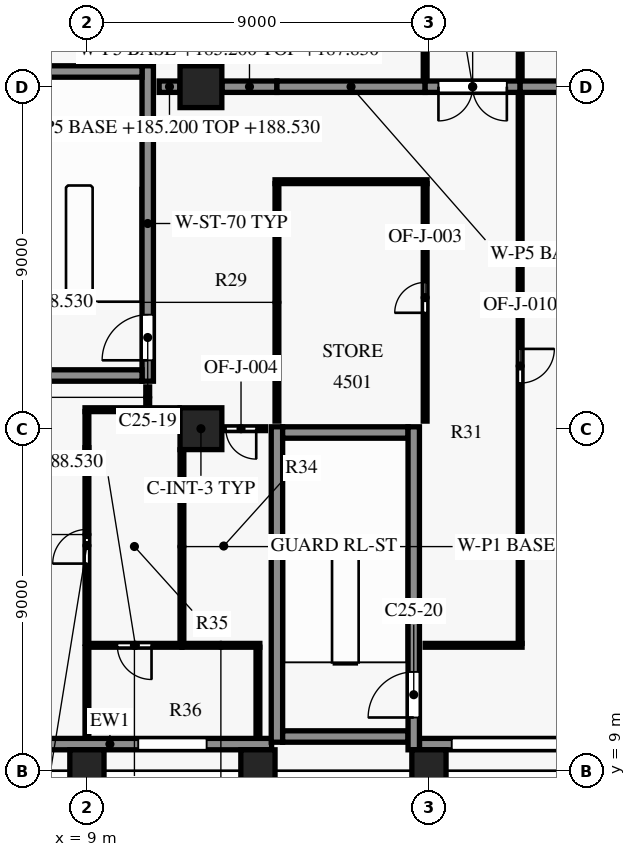
"""IFC4 building model, lengths in metres.
Left out: names, types, materials, properties, quantities, classifications, styles, units other than length and angle.
Written with IfcOpenShell. Run it as: python <this file> out.ifc"""

import sys

from ifc_helpers import new_model, si_unit, direction, frame, frame_2d, origin, origin_2d, place, context, subcontext, project, spatial, rectangle, extrude, element, fill, save


model = new_model("IFC4")
c1 = context("Model", 3, precision=1e-05, world=origin(), true_north=direction((0.0, 1.0)))
c2 = subcontext(c1, "Body", "Model", "MODEL_VIEW")
j1 = project(units=[si_unit("LENGTHUNIT", "METRE"), si_unit("PLANEANGLEUNIT", "RADIAN")], contexts=[c1])
p1 = place(None, origin())
s1 = spatial("IfcSite", under=j1, at=p1, CompositionType="ELEMENT")
p2 = place(p1, origin())
s2 = spatial("IfcBuilding", under=s1, at=p2, CompositionType="ELEMENT")
p3 = place(p2, frame((0.0, 0.0, 185.2)))
s3 = spatial("IfcBuildingStorey", under=s2, at=p3, CompositionType="ELEMENT", Elevation=185.2)
for number, where, z_axis, x_axis in (
    (1, (9.0, 9.0, 0.0), (0.0, 0.0, 1.0), (1.0, 0.0, 0.0)),
    (2, (13.5, 9.0, 0.0), (0.0, 0.0, 1.0), (1.0, 0.0, 0.0)),
    (3, (18.0, 9.0, 0.0), (0.0, 0.0, 1.0), (1.0, 0.0, 0.0)),
):
    element("IfcColumn", number, at=place(p3, frame(where, z_axis=z_axis, x_axis=x_axis)), inside=s3, PredefinedType="COLUMN", context=c2, shape_type="SweptSolid", body=[
        extrude(rectangle(XDim=0.9, YDim=1.1, at=origin_2d()), origin(), (0.0, 0.0, 1.0), 3.8),
    ])
for number, where, z_axis, x_axis in (
    (4, (12.0, 18.0, 0.0), (0.0, 0.0, 1.0), (1.0, 0.0, 0.0)),
    (5, (12.0, 27.0, 0.0), (0.0, 0.0, 1.0), (1.0, 0.0, 0.0)),
):
    element("IfcColumn", number, at=place(p3, frame(where, z_axis=z_axis, x_axis=x_axis)), inside=s3, PredefinedType="COLUMN", context=c2, shape_type="SweptSolid", body=[
        extrude(rectangle(XDim=1.1, YDim=1.1, at=origin_2d()), origin(), (0.0, 0.0, 1.0), 3.8),
    ])
p4 = place(p3, frame((13.86, 9.7, 0.0), z_axis=(0.0, 0.0, 1.0), x_axis=(-1.0, 0.0, 0.0)))
e6 = element("IfcWall", 6, at=p4, inside=s3, PredefinedType="SOLIDWALL", context=c2, shape_type="SweptSolid", body=[
    extrude(rectangle(XDim=8.51, YDim=0.3, at=frame_2d((4.255, 0.0))), origin(), (0.0, 0.0, 1.0), 3.15),
])
p5 = place(p4, frame((1.71, 0.0, 0.75)))
e7 = element("IfcOpeningElement", 7, at=p5, cuts=e6, PredefinedType="OPENING", context=c2, shape_type="SweptSolid", body=[
    extrude(rectangle(XDim=1.8, YDim=1.8, at=frame_2d((0.9, 0.9))), frame((0.0, 0.16, 0.0), z_axis=(0.0, -1.0, 0.0), x_axis=(1.0, 0.0, 0.0)), (0.0, 0.0, 1.0), 0.32),
])
p6 = place(p4, frame((6.21, 0.0, 0.75)))
e8 = element("IfcOpeningElement", 8, at=p6, cuts=e6, PredefinedType="OPENING", context=c2, shape_type="SweptSolid", body=[
    extrude(rectangle(XDim=1.8, YDim=1.8, at=frame_2d((0.9, 0.9))), frame((0.0, 0.16, 0.0), z_axis=(0.0, -1.0, 0.0), x_axis=(1.0, 0.0, 0.0)), (0.0, 0.0, 1.0), 0.32),
])
p7 = place(p3, frame((30.95, 9.7, 0.0), z_axis=(0.0, 0.0, 1.0), x_axis=(-1.0, 0.0, 0.0)))
e9 = element("IfcWall", 9, at=p7, inside=s3, PredefinedType="SOLIDWALL", context=c2, shape_type="SweptSolid", body=[
    extrude(rectangle(XDim=13.2, YDim=0.3, at=frame_2d((6.6, 0.0))), origin(), (0.0, 0.0, 1.0), 3.15),
])
p8 = place(p7, frame((0.8, 0.0, 0.75)))
e10 = element("IfcOpeningElement", 10, at=p8, cuts=e9, PredefinedType="OPENING", context=c2, shape_type="SweptSolid", body=[
    extrude(rectangle(XDim=1.8, YDim=1.8, at=frame_2d((0.9, 0.9))), frame((0.0, 0.16, 0.0), z_axis=(0.0, -1.0, 0.0), x_axis=(1.0, 0.0, 0.0)), (0.0, 0.0, 1.0), 0.32),
])
p9 = place(p7, frame((5.3, 0.0, 0.75)))
e11 = element("IfcOpeningElement", 11, at=p9, cuts=e9, PredefinedType="OPENING", context=c2, shape_type="SweptSolid", body=[
    extrude(rectangle(XDim=1.8, YDim=1.8, at=frame_2d((0.9, 0.9))), frame((0.0, 0.16, 0.0), z_axis=(0.0, -1.0, 0.0), x_axis=(1.0, 0.0, 0.0)), (0.0, 0.0, 1.0), 0.32),
])
p10 = place(p7, frame((9.05, 0.0, 0.15)))
e12 = element("IfcOpeningElement", 12, at=p10, cuts=e9, PredefinedType="OPENING", context=c2, shape_type="SweptSolid", body=[
    extrude(rectangle(XDim=3.3, YDim=2.4, at=frame_2d((1.65, 1.2))), frame((0.0, 0.16, 0.0), z_axis=(0.0, -1.0, 0.0), x_axis=(1.0, 0.0, 0.0)), (0.0, 0.0, 1.0), 0.32),
])
for number, where, z_axis, x_axis in (
    (13, (14.15, 9.9, 0.0), (0.0, 0.0, 1.0), (1.0, 0.0, 0.0)),
    (14, (14.15, 17.9, 0.0), (0.0, 0.0, 1.0), (1.0, 0.0, 0.0)),
    (15, (7.15, 19.4, 0.0), (0.0, 0.0, 1.0), (1.0, 0.0, 0.0)),
    (16, (7.15, 27.4, 0.0), (0.0, 0.0, 1.0), (1.0, 0.0, 0.0)),
):
    element("IfcWall", number, at=place(p3, frame(where, z_axis=z_axis, x_axis=x_axis)), inside=s3, PredefinedType="SHEAR", context=c2, shape_type="SweptSolid", body=[
        extrude(rectangle(XDim=3.3, YDim=0.3, at=frame_2d((1.65, 0.0))), origin(), (0.0, 0.0, 1.0), 3.5),
    ])
p11 = place(p3, frame((10.6, 19.25, 0.0), z_axis=(0.0, 0.0, 1.0), x_axis=(0.0, 1.0, 0.0)))
e17 = element("IfcWall", 17, at=p11, inside=s3, PredefinedType="SHEAR", context=c2, shape_type="SweptSolid", body=[
    extrude(rectangle(XDim=8.3, YDim=0.3, at=frame_2d((4.15, 0.0))), origin(), (0.0, 0.0, 1.0), 3.5),
])
p12 = place(p11, frame((0.55, 0.0, 0.0)))
e18 = element("IfcOpeningElement", 18, at=p12, cuts=e17, PredefinedType="OPENING", context=c2, shape_type="SweptSolid", body=[
    extrude(rectangle(XDim=1.2, YDim=2.2, at=frame_2d((0.6, 1.1))), frame((0.0, 0.16, 0.0), z_axis=(0.0, -1.0, 0.0), x_axis=(1.0, 0.0, 0.0)), (0.0, 0.0, 1.0), 0.32),
])
p13 = place(p3, frame((14.0, 9.75, 0.0), z_axis=(0.0, 0.0, 1.0), x_axis=(0.0, 1.0, 0.0)))
e19 = element("IfcWall", 19, at=p13, inside=s3, PredefinedType="SHEAR", context=c2, shape_type="SweptSolid", body=[
    extrude(rectangle(XDim=8.3, YDim=0.3, at=frame_2d((4.15, 0.0))), origin(), (0.0, 0.0, 1.0), 3.5),
])
p14 = place(p3, frame((17.6, 9.55, 0.0), z_axis=(0.0, 0.0, 1.0), x_axis=(0.0, 1.0, 0.0)))
e20 = element("IfcWall", 20, at=p14, inside=s3, PredefinedType="SHEAR", context=c2, shape_type="SweptSolid", body=[
    extrude(rectangle(XDim=8.5, YDim=0.3, at=frame_2d((4.25, 0.0))), origin(), (0.0, 0.0, 1.0), 3.5),
])
p15 = place(p14, frame((0.85, 0.0, 0.0)))
e21 = element("IfcOpeningElement", 21, at=p15, cuts=e20, PredefinedType="OPENING", context=c2, shape_type="SweptSolid", body=[
    extrude(rectangle(XDim=1.2, YDim=2.2, at=frame_2d((0.6, 1.1))), frame((0.0, 0.16, 0.0), z_axis=(0.0, -1.0, 0.0), x_axis=(1.0, 0.0, 0.0)), (0.0, 0.0, 1.0), 0.32),
])
p16 = place(p3, frame((9.0, 9.87, 0.0), z_axis=(0.0, 0.0, 1.0), x_axis=(0.0, 1.0, 0.0)))
e22 = element("IfcWall", 22, at=p16, inside=s3, PredefinedType="PARTITIONING", context=c2, shape_type="SweptSolid", body=[
    extrude(rectangle(XDim=2.38, YDim=0.1, at=frame_2d((1.19, 0.0))), origin(), (0.0, 0.0, 1.0), 3.33),
])
p17 = place(p3, frame((13.5, 12.25, 0.0), z_axis=(0.0, 0.0, 1.0), x_axis=(0.0, -1.0, 0.0)))
e23 = element("IfcWall", 23, at=p17, inside=s3, PredefinedType="PARTITIONING", context=c2, shape_type="SweptSolid", body=[
    extrude(rectangle(XDim=2.38, YDim=0.1, at=frame_2d((1.19, 0.0))), origin(), (0.0, 0.0, 1.0), 2.63),
])
p18 = place(p3, frame((11.5, 12.3, 0.0), z_axis=(0.0, 0.0, 1.0), x_axis=(-1.0, 0.0, 0.0)))
e24 = element("IfcWall", 24, at=p18, inside=s3, PredefinedType="PARTITIONING", context=c2, shape_type="SweptSolid", body=[
    extrude(rectangle(XDim=2.45, YDim=0.1, at=frame_2d((1.225, 0.0))), origin(), (0.0, 0.0, 1.0), 3.33),
])
p19 = place(p18, frame((0.8, 0.0, 0.0)))
e25 = element("IfcOpeningElement", 25, at=p19, cuts=e24, PredefinedType="OPENING", context=c2, shape_type="SweptSolid", body=[
    extrude(rectangle(XDim=0.9, YDim=2.1, at=frame_2d((0.45, 1.05))), frame((0.0, 0.06, 0.0), z_axis=(0.0, -1.0, 0.0), x_axis=(1.0, 0.0, 0.0)), (0.0, 0.0, 1.0), 0.12),
])
p20 = place(p3, frame((11.5, 12.3, 0.0), z_axis=(0.0, 0.0, 1.0), x_axis=(1.0, 0.0, 0.0)))
e26 = element("IfcWall", 26, at=p20, inside=s3, PredefinedType="PARTITIONING", context=c2, shape_type="SweptSolid", body=[
    extrude(rectangle(XDim=2.05, YDim=0.1, at=frame_2d((1.025, 0.0))), origin(), (0.0, 0.0, 1.0), 2.63),
])
p21 = place(p3, frame((20.45, 12.3, 0.0), z_axis=(0.0, 0.0, 1.0), x_axis=(-1.0, 0.0, 0.0)))
e27 = element("IfcWall", 27, at=p21, inside=s3, PredefinedType="PARTITIONING", context=c2, shape_type="SweptSolid", body=[
    extrude(rectangle(XDim=2.55, YDim=0.1, at=frame_2d((1.275, 0.0))), origin(), (0.0, 0.0, 1.0), 2.63),
])
p22 = place(p3, frame((9.0, 12.35, 0.0), z_axis=(0.0, 0.0, 1.0), x_axis=(0.0, 1.0, 0.0)))
e28 = element("IfcWall", 28, at=p22, inside=s3, PredefinedType="PARTITIONING", context=c2, shape_type="SweptSolid", body=[
    extrude(rectangle(XDim=5.15, YDim=0.1, at=frame_2d((2.575, 0.0))), origin(), (0.0, 0.0, 1.0), 3.33),
])
p23 = place(p22, frame((2.1, 0.0, 0.0)))
e29 = element("IfcOpeningElement", 29, at=p23, cuts=e28, PredefinedType="OPENING", context=c2, shape_type="SweptSolid", body=[
    extrude(rectangle(XDim=0.9, YDim=2.1, at=frame_2d((0.45, 1.05))), frame((0.0, 0.06, 0.0), z_axis=(0.0, -1.0, 0.0), x_axis=(1.0, 0.0, 0.0)), (0.0, 0.0, 1.0), 0.12),
])
p24 = place(p3, frame((11.5, 17.445, 0.0), z_axis=(0.0, 0.0, 1.0), x_axis=(0.0, -1.0, 0.0)))
e30 = element("IfcWall", 30, at=p24, inside=s3, PredefinedType="PARTITIONING", context=c2, shape_type="SweptSolid", body=[
    extrude(rectangle(XDim=5.095, YDim=0.1, at=frame_2d((2.547, 0.0))), origin(), (0.0, 0.0, 1.0), 3.33),
])
p25 = place(p3, frame((9.0, 17.5, 0.0), z_axis=(0.0, 0.0, 1.0), x_axis=(0.0, 1.0, 0.0)))
e31 = element("IfcWall", 31, at=p25, inside=s3, PredefinedType="PARTITIONING", context=c2, shape_type="SweptSolid", body=[
    extrude(rectangle(XDim=0.95, YDim=0.1, at=frame_2d((0.475, 0.0))), origin(), (0.0, 0.0, 1.0), 2.78),
])
p26 = place(p3, frame((13.7, 18.0, 0.0), z_axis=(0.0, 0.0, 1.0), x_axis=(-1.0, 0.0, 0.0)))
e32 = element("IfcWall", 32, at=p26, inside=s3, PredefinedType="PARTITIONING", context=c2, shape_type="SweptSolid", body=[
    extrude(rectangle(XDim=1.145, YDim=0.1, at=frame_2d((0.573, 0.0))), origin(), (0.0, 0.0, 1.0), 2.63),
])
p27 = place(p26, frame((0.245, 0.0, 0.0)))
e33 = element("IfcOpeningElement", 33, at=p27, cuts=e32, PredefinedType="OPENING", context=c2, shape_type="SweptSolid", body=[
    extrude(rectangle(XDim=0.8, YDim=2.1, at=frame_2d((0.4, 1.05))), frame((0.0, 0.06, 0.0), z_axis=(0.0, -1.0, 0.0), x_axis=(1.0, 0.0, 0.0)), (0.0, 0.0, 1.0), 0.12),
])
p28 = place(p3, frame((17.9, 18.2, 0.0), z_axis=(0.0, 0.0, 1.0), x_axis=(0.0, 1.0, 0.0)))
e34 = element("IfcWall", 34, at=p28, inside=s3, PredefinedType="PARTITIONING", context=c2, shape_type="SweptSolid", body=[
    extrude(rectangle(XDim=6.25, YDim=0.1, at=frame_2d((3.125, 0.0))), origin(), (0.0, 0.0, 1.0), 2.63),
])
p29 = place(p28, frame((2.85, 0.0, 0.0)))
e35 = element("IfcOpeningElement", 35, at=p29, cuts=e34, PredefinedType="OPENING", context=c2, shape_type="SweptSolid", body=[
    extrude(rectangle(XDim=0.8, YDim=2.1, at=frame_2d((0.4, 1.05))), frame((0.0, 0.06, 0.0), z_axis=(0.0, -1.0, 0.0), x_axis=(1.0, 0.0, 0.0)), (0.0, 0.0, 1.0), 0.12),
])
p30 = place(p3, frame((8.95, 18.5, 0.0), z_axis=(0.0, 0.0, 1.0), x_axis=(1.0, 0.0, 0.0)))
e36 = element("IfcWall", 36, at=p30, inside=s3, PredefinedType="PARTITIONING", context=c2, shape_type="SweptSolid", body=[
    extrude(rectangle(XDim=2.48, YDim=0.1, at=frame_2d((1.24, 0.0))), origin(), (0.0, 0.0, 1.0), 3.33),
])
p31 = place(p3, frame((10.6, 18.55, 0.0), z_axis=(0.0, 0.0, 1.0), x_axis=(0.0, 1.0, 0.0)))
e37 = element("IfcWall", 37, at=p31, inside=s3, PredefinedType="PARTITIONING", context=c2, shape_type="SweptSolid", body=[
    extrude(rectangle(XDim=0.55, YDim=0.1, at=frame_2d((0.275, 0.0))), origin(), (0.0, 0.0, 1.0), 3.33),
])
p32 = place(p3, frame((14.0, 24.45, 0.0), z_axis=(0.0, 0.0, 1.0), x_axis=(0.0, -1.0, 0.0)))
e38 = element("IfcWall", 38, at=p32, inside=s3, PredefinedType="PARTITIONING", context=c2, shape_type="SweptSolid", body=[
    extrude(rectangle(XDim=6.25, YDim=0.1, at=frame_2d((3.125, 0.0))), origin(), (0.0, 0.0, 1.0), 3.33),
])
p33 = place(p3, frame((17.95, 24.5, 0.0), z_axis=(0.0, 0.0, 1.0), x_axis=(-1.0, 0.0, 0.0)))
e39 = element("IfcWall", 39, at=p33, inside=s3, PredefinedType="PARTITIONING", context=c2, shape_type="SweptSolid", body=[
    extrude(rectangle(XDim=4.0, YDim=0.1, at=frame_2d((2.0, 0.0))), origin(), (0.0, 0.0, 1.0), 2.63),
])
p34 = place(p3, frame((20.4, 26.83, 0.0), z_axis=(0.0, 0.0, 1.0), x_axis=(0.0, -1.0, 0.0)))
e40 = element("IfcWall", 40, at=p34, inside=s3, PredefinedType="PARTITIONING", context=c2, shape_type="SweptSolid", body=[
    extrude(rectangle(XDim=14.48, YDim=0.1, at=frame_2d((7.24, 0.0))), origin(), (0.0, 0.0, 1.0), 2.63),
])
p35 = place(p34, frame((6.73, 0.0, 0.0)))
e41 = element("IfcOpeningElement", 41, at=p35, cuts=e40, PredefinedType="OPENING", context=c2, shape_type="SweptSolid", body=[
    extrude(rectangle(XDim=0.9, YDim=2.1, at=frame_2d((0.45, 1.05))), frame((0.0, 0.06, 0.0), z_axis=(0.0, -1.0, 0.0), x_axis=(1.0, 0.0, 0.0)), (0.0, 0.0, 1.0), 0.12),
])
p36 = place(p3, frame((10.9, 27.0, 0.0), z_axis=(0.0, 0.0, 1.0), x_axis=(1.0, 0.0, 0.0)))
e42 = element("IfcWall", 42, at=p36, inside=s3, PredefinedType="PARTITIONING", context=c2, shape_type="SweptSolid", body=[
    extrude(rectangle(XDim=0.545, YDim=0.3, at=frame_2d((0.272, 0.0))), origin(), (0.0, 0.0, 1.0), 3.33),
])
p37 = place(p3, frame((12.555, 27.0, 0.0), z_axis=(0.0, 0.0, 1.0), x_axis=(1.0, 0.0, 0.0)))
e43 = element("IfcWall", 43, at=p37, inside=s3, PredefinedType="PARTITIONING", context=c2, shape_type="SweptSolid", body=[
    extrude(rectangle(XDim=1.445, YDim=0.3, at=frame_2d((0.723, 0.0))), origin(), (0.0, 0.0, 1.0), 2.63),
])
p38 = place(p3, frame((14.0, 27.0, 0.0), z_axis=(0.0, 0.0, 1.0), x_axis=(1.0, 0.0, 0.0)))
e44 = element("IfcWall", 44, at=p38, inside=s3, PredefinedType="PARTITIONING", context=c2, shape_type="SweptSolid", body=[
    extrude(rectangle(XDim=3.9, YDim=0.3, at=frame_2d((1.95, 0.0))), origin(), (0.0, 0.0, 1.0), 2.63),
])
p39 = place(p3, frame((20.4, 27.0, 0.0), z_axis=(0.0, 0.0, 1.0), x_axis=(-1.0, 0.0, 0.0)))
e45 = element("IfcWall", 45, at=p39, inside=s3, PredefinedType="PARTITIONING", context=c2, shape_type="SweptSolid", body=[
    extrude(rectangle(XDim=2.5, YDim=0.3, at=frame_2d((1.25, 0.0))), origin(), (0.0, 0.0, 1.0), 2.63),
])
p40 = place(p39, frame((0.35, 0.0, 0.0)))
e46 = element("IfcOpeningElement", 46, at=p40, cuts=e45, PredefinedType="OPENING", context=c2, shape_type="SweptSolid", body=[
    extrude(rectangle(XDim=1.8, YDim=2.1, at=frame_2d((0.9, 1.05))), frame((0.0, 0.16, 0.0), z_axis=(0.0, -1.0, 0.0), x_axis=(1.0, 0.0, 0.0)), (0.0, 0.0, 1.0), 0.32),
])
p41 = place(p3, frame((20.4, 27.0, 0.0), z_axis=(0.0, 0.0, 1.0), x_axis=(1.0, 0.0, 0.0)))
e47 = element("IfcWall", 47, at=p41, inside=s3, PredefinedType="PARTITIONING", context=c2, shape_type="SweptSolid", body=[
    extrude(rectangle(XDim=3.045, YDim=0.3, at=frame_2d((1.522, 0.0))), origin(), (0.0, 0.0, 1.0), 2.63),
])
p42 = place(p3, frame((17.9, 27.17, 0.0), z_axis=(0.0, 0.0, 1.0), x_axis=(0.0, 1.0, 0.0)))
e48 = element("IfcWall", 48, at=p42, inside=s3, PredefinedType="PARTITIONING", context=c2, shape_type="SweptSolid", body=[
    extrude(rectangle(XDim=6.28, YDim=0.1, at=frame_2d((3.14, 0.0))), origin(), (0.0, 0.0, 1.0), 2.63),
])
p43 = place(p3, frame((10.748, 33.45, 0.0), z_axis=(0.0, 0.0, 1.0), x_axis=(0.0, -1.0, 0.0)))
e49 = element("IfcWall", 49, at=p43, inside=s3, PredefinedType="PARTITIONING", context=c2, shape_type="SweptSolid", body=[
    extrude(rectangle(XDim=5.75, YDim=0.1, at=frame_2d((2.875, 0.0))), origin(), (0.0, 0.0, 1.0), 3.33),
])
p44 = place(p3, frame((20.4, 33.45, 0.0), z_axis=(0.0, 0.0, 1.0), x_axis=(0.0, -1.0, 0.0)))
e50 = element("IfcWall", 50, at=p44, inside=s3, PredefinedType="PARTITIONING", context=c2, shape_type="SweptSolid", body=[
    extrude(rectangle(XDim=6.28, YDim=0.1, at=frame_2d((3.14, 0.0))), origin(), (0.0, 0.0, 1.0), 2.63),
])
p45 = place(p5, origin())
e51 = element("IfcWindow", 51, at=p45, inside=s3, PartitioningType="SINGLE_PANEL", PredefinedType="WINDOW", context=c2, shape_type="SweptSolid", body=[
    extrude(rectangle(XDim=1.8, YDim=1.8, at=frame_2d((0.9, 0.9))), frame((0.0, 0.03, 0.0), z_axis=(0.0, -1.0, 0.0), x_axis=(1.0, 0.0, 0.0)), (0.0, 0.0, 1.0), 0.06),
])
fill(e7, e51)
p46 = place(p10, origin())
e52 = element("IfcWindow", 52, at=p46, inside=s3, PartitioningType="SINGLE_PANEL", PredefinedType="WINDOW", context=c2, shape_type="SweptSolid", body=[
    extrude(rectangle(XDim=3.3, YDim=2.4, at=frame_2d((1.65, 1.2))), frame((0.0, 0.03, 0.0), z_axis=(0.0, -1.0, 0.0), x_axis=(1.0, 0.0, 0.0)), (0.0, 0.0, 1.0), 0.06),
])
fill(e12, e52)
p47 = place(p12, origin())
e53 = element("IfcDoor", 53, at=p47, inside=s3, OperationType="SINGLE_SWING_RIGHT", PredefinedType="DOOR", context=c2, shape_type="SweptSolid", body=[
    extrude(rectangle(XDim=1.2, YDim=2.2, at=frame_2d((0.6, 1.1))), frame((0.0, 0.025, 0.0), z_axis=(0.0, -1.0, 0.0), x_axis=(1.0, 0.0, 0.0)), (0.0, 0.0, 1.0), 0.05),
])
fill(e18, e53)
p48 = place(p15, origin())
e54 = element("IfcDoor", 54, at=p48, inside=s3, OperationType="SINGLE_SWING_LEFT", PredefinedType="DOOR", context=c2, shape_type="SweptSolid", body=[
    extrude(rectangle(XDim=1.2, YDim=2.2, at=frame_2d((0.6, 1.1))), frame((0.0, 0.025, 0.0), z_axis=(0.0, -1.0, 0.0), x_axis=(1.0, 0.0, 0.0)), (0.0, 0.0, 1.0), 0.05),
])
fill(e21, e54)
p49 = place(p19, origin())
e55 = element("IfcDoor", 55, at=p49, inside=s3, OperationType="SINGLE_SWING_RIGHT", PredefinedType="DOOR", context=c2, shape_type="SweptSolid", body=[
    extrude(rectangle(XDim=0.9, YDim=2.1, at=frame_2d((0.45, 1.05))), frame((0.0, 0.025, 0.0), z_axis=(0.0, -1.0, 0.0), x_axis=(1.0, 0.0, 0.0)), (0.0, 0.0, 1.0), 0.05),
])
fill(e25, e55)
p50 = place(p29, origin())
e56 = element("IfcDoor", 56, at=p50, inside=s3, OperationType="SINGLE_SWING_LEFT", PredefinedType="DOOR", context=c2, shape_type="SweptSolid", body=[
    extrude(rectangle(XDim=0.8, YDim=2.1, at=frame_2d((0.4, 1.05))), frame((0.0, 0.025, 0.0), z_axis=(0.0, -1.0, 0.0), x_axis=(1.0, 0.0, 0.0)), (0.0, 0.0, 1.0), 0.05),
])
fill(e35, e56)
p51 = place(p27, origin())
e57 = element("IfcDoor", 57, at=p51, inside=s3, OperationType="SINGLE_SWING_LEFT", PredefinedType="DOOR", context=c2, shape_type="SweptSolid", body=[
    extrude(rectangle(XDim=0.8, YDim=2.1, at=frame_2d((0.4, 1.05))), frame((0.0, 0.025, 0.0), z_axis=(0.0, -1.0, 0.0), x_axis=(1.0, 0.0, 0.0)), (0.0, 0.0, 1.0), 0.05),
])
fill(e33, e57)
p52 = place(p35, origin())
e58 = element("IfcDoor", 58, at=p52, inside=s3, OperationType="SINGLE_SWING_LEFT", PredefinedType="DOOR", context=c2, shape_type="SweptSolid", body=[
    extrude(rectangle(XDim=0.9, YDim=2.1, at=frame_2d((0.45, 1.05))), frame((0.0, 0.025, 0.0), z_axis=(0.0, -1.0, 0.0), x_axis=(1.0, 0.0, 0.0)), (0.0, 0.0, 1.0), 0.05),
])
fill(e41, e58)
p53 = place(p23, origin())
e59 = element("IfcDoor", 59, at=p53, inside=s3, OperationType="SINGLE_SWING_RIGHT", PredefinedType="DOOR", context=c2, shape_type="SweptSolid", body=[
    extrude(rectangle(XDim=0.9, YDim=2.1, at=frame_2d((0.45, 1.05))), frame((0.0, 0.025, 0.0), z_axis=(0.0, -1.0, 0.0), x_axis=(1.0, 0.0, 0.0)), (0.0, 0.0, 1.0), 0.05),
])
fill(e29, e59)
p54 = place(p40, origin())
e60 = element("IfcDoor", 60, at=p54, inside=s3, OperationType="DOUBLE_DOOR_SINGLE_SWING", PredefinedType="DOOR", context=c2, shape_type="SweptSolid", body=[
    extrude(rectangle(XDim=1.8, YDim=2.1, at=frame_2d((0.9, 1.05))), frame((0.0, 0.025, 0.0), z_axis=(0.0, -1.0, 0.0), x_axis=(1.0, 0.0, 0.0)), (0.0, 0.0, 1.0), 0.05),
])
fill(e46, e60)
save(model, sys.argv[1])
